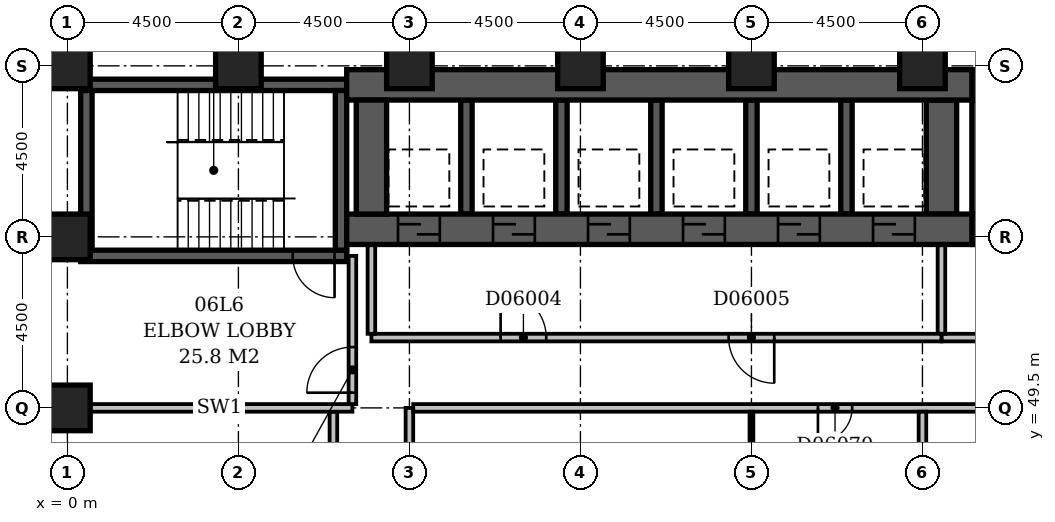
"""IFC4 building model, lengths in metres.
Left out: names, types, materials, properties, quantities, classifications, styles, units other than length and angle.
Written with IfcOpenShell. Run it as: python <this file> out.ifc"""

import sys

from ifc_helpers import new_model, si_unit, direction, frame, frame_2d, origin, origin_2d, place, context, subcontext, project, spatial, rectangle, extrude, element, fill, save


model = new_model("IFC4")
c1 = context("Model", 3, precision=1e-05, world=origin(), true_north=direction((0.0, 1.0)))
c2 = subcontext(c1, "Body", "Model", "MODEL_VIEW")
j1 = project(units=[si_unit("LENGTHUNIT", "METRE"), si_unit("PLANEANGLEUNIT", "RADIAN")], contexts=[c1])
p1 = place(None, origin())
s1 = spatial("IfcSite", under=j1, at=p1, CompositionType="ELEMENT")
p2 = place(p1, origin())
s2 = spatial("IfcBuilding", under=s1, at=p2, CompositionType="ELEMENT")
p3 = place(p2, frame((0.0, 0.0, 32.6)))
s3 = spatial("IfcBuildingStorey", under=s2, at=p3, CompositionType="ELEMENT", Elevation=32.6)
p4 = place(p3, frame((0.35, 53.5, -0.3), z_axis=(0.0, 0.0, 1.0), x_axis=(1.0, 0.0, 0.0)))
e1 = element("IfcWall", 1, at=p4, inside=s3, PredefinedType="SHEAR", context=c2, shape_type="SweptSolid", body=[
    extrude(rectangle(XDim=7.0, YDim=0.3, at=frame_2d((3.5, 0.0))), origin(), (0.0, 0.0, 1.0), 3.6),
])
p5 = place(p4, frame((5.58, 0.0, 0.3)))
e2 = element("IfcOpeningElement", 2, at=p5, cuts=e1, PredefinedType="OPENING", context=c2, shape_type="SweptSolid", body=[
    extrude(rectangle(XDim=1.1, YDim=2.1, at=frame_2d((0.55, 1.05))), frame((0.0, 0.162, 0.0), z_axis=(0.0, -1.0, 0.0), x_axis=(1.0, 0.0, 0.0)), (0.0, 0.0, 1.0), 0.324),
])
p6 = place(p3, frame((0.35, 58.0, -0.3), z_axis=(0.0, 0.0, 1.0), x_axis=(1.0, 0.0, 0.0)))
e3 = element("IfcWall", 3, at=p6, inside=s3, PredefinedType="SHEAR", context=c2, shape_type="SweptSolid", body=[
    extrude(rectangle(XDim=7.0, YDim=0.3, at=frame_2d((3.5, 0.0))), origin(), (0.0, 0.0, 1.0), 3.6),
])
for number, where, z_axis, x_axis in (
    (4, (0.5, 53.65, -0.3), (0.0, 0.0, 1.0), (0.0, 1.0, 0.0)),
    (5, (7.2, 53.65, -0.3), (0.0, 0.0, 1.0), (0.0, 1.0, 0.0)),
):
    element("IfcWall", number, at=place(p3, frame(where, z_axis=z_axis, x_axis=x_axis)), inside=s3, PredefinedType="SHEAR", context=c2, shape_type="SweptSolid", body=[
        extrude(rectangle(XDim=4.2, YDim=0.3, at=frame_2d((2.1, 0.0))), origin(), (0.0, 0.0, 1.0), 3.6),
    ])
p7 = place(p3, frame((7.35, 54.2, -0.3), z_axis=(0.0, 0.0, 1.0), x_axis=(1.0, 0.0, 0.0)))
e6 = element("IfcWall", 6, at=p7, inside=s3, PredefinedType="SHEAR", context=c2, shape_type="SweptSolid", body=[
    extrude(rectangle(XDim=16.45, YDim=0.8, at=frame_2d((8.225, 0.0))), origin(), (0.0, 0.0, 1.0), 3.6),
])
p8 = place(p7, frame((1.35, 0.0, 0.3)))
e7 = element("IfcOpeningElement", 7, at=p8, cuts=e6, PredefinedType="OPENING", context=c2, shape_type="SweptSolid", body=[
    extrude(rectangle(XDim=1.1, YDim=2.1, at=frame_2d((0.55, 1.05))), frame((0.0, 0.412, 0.0), z_axis=(0.0, -1.0, 0.0), x_axis=(1.0, 0.0, 0.0)), (0.0, 0.0, 1.0), 0.824),
])
p9 = place(p7, frame((3.85, 0.0, 0.3)))
e8 = element("IfcOpeningElement", 8, at=p9, cuts=e6, PredefinedType="OPENING", context=c2, shape_type="SweptSolid", body=[
    extrude(rectangle(XDim=1.1, YDim=2.1, at=frame_2d((0.55, 1.05))), frame((0.0, 0.412, 0.0), z_axis=(0.0, -1.0, 0.0), x_axis=(1.0, 0.0, 0.0)), (0.0, 0.0, 1.0), 0.824),
])
p10 = place(p7, frame((6.35, 0.0, 0.3)))
e9 = element("IfcOpeningElement", 9, at=p10, cuts=e6, PredefinedType="OPENING", context=c2, shape_type="SweptSolid", body=[
    extrude(rectangle(XDim=1.1, YDim=2.1, at=frame_2d((0.55, 1.05))), frame((0.0, 0.412, 0.0), z_axis=(0.0, -1.0, 0.0), x_axis=(1.0, 0.0, 0.0)), (0.0, 0.0, 1.0), 0.824),
])
p11 = place(p7, frame((8.85, 0.0, 0.3)))
e10 = element("IfcOpeningElement", 10, at=p11, cuts=e6, PredefinedType="OPENING", context=c2, shape_type="SweptSolid", body=[
    extrude(rectangle(XDim=1.1, YDim=2.1, at=frame_2d((0.55, 1.05))), frame((0.0, 0.412, 0.0), z_axis=(0.0, -1.0, 0.0), x_axis=(1.0, 0.0, 0.0)), (0.0, 0.0, 1.0), 0.824),
])
p12 = place(p7, frame((11.35, 0.0, 0.3)))
e11 = element("IfcOpeningElement", 11, at=p12, cuts=e6, PredefinedType="OPENING", context=c2, shape_type="SweptSolid", body=[
    extrude(rectangle(XDim=1.1, YDim=2.1, at=frame_2d((0.55, 1.05))), frame((0.0, 0.412, 0.0), z_axis=(0.0, -1.0, 0.0), x_axis=(1.0, 0.0, 0.0)), (0.0, 0.0, 1.0), 0.824),
])
p13 = place(p7, frame((13.85, 0.0, 0.3)))
e12 = element("IfcOpeningElement", 12, at=p13, cuts=e6, PredefinedType="OPENING", context=c2, shape_type="SweptSolid", body=[
    extrude(rectangle(XDim=1.1, YDim=2.1, at=frame_2d((0.55, 1.05))), frame((0.0, 0.412, 0.0), z_axis=(0.0, -1.0, 0.0), x_axis=(1.0, 0.0, 0.0)), (0.0, 0.0, 1.0), 0.824),
])
p14 = place(p3, frame((7.35, 58.0, -0.3), z_axis=(0.0, 0.0, 1.0), x_axis=(1.0, 0.0, 0.0)))
e13 = element("IfcWall", 13, at=p14, inside=s3, PredefinedType="SHEAR", context=c2, shape_type="SweptSolid", body=[
    extrude(rectangle(XDim=16.45, YDim=0.8, at=frame_2d((8.225, 0.0))), origin(), (0.0, 0.0, 1.0), 3.6),
])
p15 = place(p3, frame((8.0, 54.6, -0.3), z_axis=(0.0, 0.0, 1.0), x_axis=(0.0, 1.0, 0.0)))
e14 = element("IfcWall", 14, at=p15, inside=s3, PredefinedType="SHEAR", context=c2, shape_type="SweptSolid", body=[
    extrude(rectangle(XDim=3.0, YDim=0.8, at=frame_2d((1.5, 0.0))), origin(), (0.0, 0.0, 1.0), 3.6),
])
for number, where, z_axis, x_axis in (
    (15, (10.5, 54.6, -0.3), (0.0, 0.0, 1.0), (0.0, 1.0, 0.0)),
    (16, (13.0, 54.6, -0.3), (0.0, 0.0, 1.0), (0.0, 1.0, 0.0)),
    (17, (15.5, 54.6, -0.3), (0.0, 0.0, 1.0), (0.0, 1.0, 0.0)),
    (18, (18.0, 54.6, -0.3), (0.0, 0.0, 1.0), (0.0, 1.0, 0.0)),
    (19, (20.5, 54.6, -0.3), (0.0, 0.0, 1.0), (0.0, 1.0, 0.0)),
):
    element("IfcWall", number, at=place(p3, frame(where, z_axis=z_axis, x_axis=x_axis)), inside=s3, PredefinedType="SHEAR", context=c2, shape_type="SweptSolid", body=[
        extrude(rectangle(XDim=3.0, YDim=0.3, at=frame_2d((1.5, 0.0))), origin(), (0.0, 0.0, 1.0), 3.6),
    ])
p16 = place(p3, frame((23.0, 54.6, -0.3), z_axis=(0.0, 0.0, 1.0), x_axis=(0.0, 1.0, 0.0)))
e20 = element("IfcWall", 20, at=p16, inside=s3, PredefinedType="SHEAR", context=c2, shape_type="SweptSolid", body=[
    extrude(rectangle(XDim=3.0, YDim=0.8, at=frame_2d((1.5, 0.0))), origin(), (0.0, 0.0, 1.0), 3.6),
])
p17 = place(p3, frame((23.8, 54.2, -0.3), z_axis=(0.0, 0.0, 1.0), x_axis=(1.0, 0.0, 0.0)))
e21 = element("IfcWall", 21, at=p17, inside=s3, PredefinedType="SHEAR", context=c2, shape_type="SweptSolid", body=[
    extrude(rectangle(XDim=3.3, YDim=0.8, at=frame_2d((1.65, 0.0))), origin(), (0.0, 0.0, 1.0), 3.6),
])
p18 = place(p17, frame((1.1, 0.0, 0.3)))
e22 = element("IfcOpeningElement", 22, at=p18, cuts=e21, PredefinedType="OPENING", context=c2, shape_type="SweptSolid", body=[
    extrude(rectangle(XDim=1.1, YDim=2.1, at=frame_2d((0.55, 1.05))), frame((0.0, 0.412, 0.0), z_axis=(0.0, -1.0, 0.0), x_axis=(1.0, 0.0, 0.0)), (0.0, 0.0, 1.0), 0.824),
])
p19 = place(p3, frame((23.8, 58.0, -0.3), z_axis=(0.0, 0.0, 1.0), x_axis=(1.0, 0.0, 0.0)))
e23 = element("IfcWall", 23, at=p19, inside=s3, PredefinedType="SHEAR", context=c2, shape_type="SweptSolid", body=[
    extrude(rectangle(XDim=3.3, YDim=0.8, at=frame_2d((1.65, 0.0))), origin(), (0.0, 0.0, 1.0), 3.6),
])
p20 = place(p3, frame((24.2, 54.6, -0.3), z_axis=(0.0, 0.0, 1.0), x_axis=(0.0, 1.0, 0.0)))
e24 = element("IfcWall", 24, at=p20, inside=s3, PredefinedType="SHEAR", context=c2, shape_type="SweptSolid", body=[
    extrude(rectangle(XDim=3.0, YDim=0.8, at=frame_2d((1.5, 0.0))), origin(), (0.0, 0.0, 1.0), 3.6),
])
for number, where, z_axis, x_axis in (
    (25, (0.0, 49.5, -0.3), (0.0, 0.0, 1.0), (1.0, 0.0, 0.0)),
    (26, (0.0, 54.0, -0.3), (0.0, 0.0, 1.0), (1.0, 0.0, 0.0)),
    (27, (0.0, 58.5, -0.3), (0.0, 0.0, 1.0), (1.0, 0.0, 0.0)),
    (28, (4.5, 58.5, -0.3), (0.0, 0.0, 1.0), (1.0, 0.0, 0.0)),
    (29, (9.0, 58.5, -0.3), (0.0, 0.0, 1.0), (1.0, 0.0, 0.0)),
    (30, (13.5, 58.5, -0.3), (0.0, 0.0, 1.0), (1.0, 0.0, 0.0)),
    (31, (18.0, 58.5, -0.3), (0.0, 0.0, 1.0), (1.0, 0.0, 0.0)),
    (32, (22.5, 58.5, -0.3), (0.0, 0.0, 1.0), (1.0, 0.0, 0.0)),
):
    element("IfcColumn", number, at=place(p3, frame(where, z_axis=z_axis, x_axis=x_axis)), inside=s3, PredefinedType="COLUMN", context=c2, shape_type="SweptSolid", body=[
        extrude(rectangle(XDim=1.2, YDim=1.2, at=origin_2d()), origin(), (0.0, 0.0, 1.0), 3.6),
    ])
p21 = place(p3, frame((8.0, 51.35, 0.0), z_axis=(0.0, 0.0, 1.0), x_axis=(1.0, 0.0, 0.0)))
e33 = element("IfcWall", 33, at=p21, inside=s3, PredefinedType="PARTITIONING", context=c2, shape_type="SweptSolid", body=[
    extrude(rectangle(XDim=15.0, YDim=0.2, at=frame_2d((7.5, 0.0))), origin(), (0.0, 0.0, 1.0), 3.3),
])
p22 = place(p21, frame((3.4, 0.0, 0.0)))
e34 = element("IfcOpeningElement", 34, at=p22, cuts=e33, PredefinedType="OPENING", context=c2, shape_type="SweptSolid", body=[
    extrude(rectangle(XDim=1.2, YDim=2.1, at=frame_2d((0.6, 1.05))), frame((0.0, 0.112, 0.0), z_axis=(0.0, -1.0, 0.0), x_axis=(1.0, 0.0, 0.0)), (0.0, 0.0, 1.0), 0.224),
])
p23 = place(p21, frame((9.4, 0.0, 0.0)))
e35 = element("IfcOpeningElement", 35, at=p23, cuts=e33, PredefinedType="OPENING", context=c2, shape_type="SweptSolid", body=[
    extrude(rectangle(XDim=1.2, YDim=2.1, at=frame_2d((0.6, 1.05))), frame((0.0, 0.112, 0.0), z_axis=(0.0, -1.0, 0.0), x_axis=(1.0, 0.0, 0.0)), (0.0, 0.0, 1.0), 0.224),
])
for number, where, z_axis, x_axis in (
    (36, (23.0, 51.45, 0.0), (0.0, 0.0, 1.0), (0.0, 1.0, 0.0)),
    (37, (8.0, 51.45, 0.0), (0.0, 0.0, 1.0), (0.0, 1.0, 0.0)),
):
    element("IfcWall", number, at=place(p3, frame(where, z_axis=z_axis, x_axis=x_axis)), inside=s3, PredefinedType="PARTITIONING", context=c2, shape_type="SweptSolid", body=[
        extrude(rectangle(XDim=2.33, YDim=0.2, at=frame_2d((1.165, 0.0))), origin(), (0.0, 0.0, 1.0), 3.3),
    ])
p24 = place(p3, frame((23.0, 51.35, 0.0), z_axis=(0.0, 0.0, 1.0), x_axis=(1.0, 0.0, 0.0)))
e38 = element("IfcWall", 38, at=p24, inside=s3, PredefinedType="PARTITIONING", context=c2, shape_type="SweptSolid", body=[
    extrude(rectangle(XDim=4.8, YDim=0.2, at=frame_2d((2.4, 0.0))), origin(), (0.0, 0.0, 1.0), 3.3),
])
p25 = place(p24, frame((1.65, 0.0, 0.0)))
e39 = element("IfcOpeningElement", 39, at=p25, cuts=e38, PredefinedType="OPENING", context=c2, shape_type="SweptSolid", body=[
    extrude(rectangle(XDim=1.2, YDim=2.1, at=frame_2d((0.6, 1.05))), frame((0.0, 0.112, 0.0), z_axis=(0.0, -1.0, 0.0), x_axis=(1.0, 0.0, 0.0)), (0.0, 0.0, 1.0), 0.224),
])
p26 = place(p3, frame((0.5, 49.5, 0.0), z_axis=(0.0, 0.0, 1.0), x_axis=(1.0, 0.0, 0.0)))
e40 = element("IfcWall", 40, at=p26, inside=s3, PredefinedType="PARTITIONING", context=c2, shape_type="SweptSolid", body=[
    extrude(rectangle(XDim=7.0, YDim=0.2, at=frame_2d((3.5, 0.0))), origin(), (0.0, 0.0, 1.0), 3.3),
])
p27 = place(p3, frame((7.5, 49.6, 0.0), z_axis=(0.0, 0.0, 1.0), x_axis=(0.0, 1.0, 0.0)))
e41 = element("IfcWall", 41, at=p27, inside=s3, PredefinedType="PARTITIONING", context=c2, shape_type="SweptSolid", body=[
    extrude(rectangle(XDim=3.9, YDim=0.2, at=frame_2d((1.95, 0.0))), origin(), (0.0, 0.0, 1.0), 3.3),
])
p28 = place(p27, frame((0.3, 0.0, 0.0)))
e42 = element("IfcOpeningElement", 42, at=p28, cuts=e41, PredefinedType="OPENING", context=c2, shape_type="SweptSolid", body=[
    extrude(rectangle(XDim=1.2, YDim=2.1, at=frame_2d((0.6, 1.05))), frame((0.0, 0.112, 0.0), z_axis=(0.0, -1.0, 0.0), x_axis=(1.0, 0.0, 0.0)), (0.0, 0.0, 1.0), 0.224),
])
p29 = place(p3, frame((9.0, 5.0, 0.0), z_axis=(0.0, 0.0, 1.0), x_axis=(0.0, 1.0, 0.0)))
e43 = element("IfcWall", 43, at=p29, inside=s3, PredefinedType="PARTITIONING", context=c2, shape_type="SweptSolid", body=[
    extrude(rectangle(XDim=44.5, YDim=0.2, at=frame_2d((22.25, 0.0))), origin(), (0.0, 0.0, 1.0), 3.3),
])
p30 = place(p29, frame((24.7, 0.0, 0.0)))
e44 = element("IfcOpeningElement", 44, at=p30, cuts=e43, PredefinedType="OPENING", context=c2, shape_type="SweptSolid", body=[
    extrude(rectangle(XDim=1.0, YDim=2.1, at=frame_2d((0.5, 1.05))), frame((0.0, 0.112, 0.0), z_axis=(0.0, -1.0, 0.0), x_axis=(1.0, 0.0, 0.0)), (0.0, 0.0, 1.0), 0.224),
])
p31 = place(p29, frame((13.3, 0.0, 0.0)))
e45 = element("IfcOpeningElement", 45, at=p31, cuts=e43, PredefinedType="OPENING", context=c2, shape_type="SweptSolid", body=[
    extrude(rectangle(XDim=1.0, YDim=2.1, at=frame_2d((0.5, 1.05))), frame((0.0, 0.112, 0.0), z_axis=(0.0, -1.0, 0.0), x_axis=(1.0, 0.0, 0.0)), (0.0, 0.0, 1.0), 0.224),
])
p32 = place(p29, frame((10.45, 0.0, 0.0)))
e46 = element("IfcOpeningElement", 46, at=p32, cuts=e43, PredefinedType="OPENING", context=c2, shape_type="SweptSolid", body=[
    extrude(rectangle(XDim=1.0, YDim=2.1, at=frame_2d((0.5, 1.05))), frame((0.0, 0.112, 0.0), z_axis=(0.0, -1.0, 0.0), x_axis=(1.0, 0.0, 0.0)), (0.0, 0.0, 1.0), 0.224),
])
p33 = place(p29, frame((5.95, 0.0, 0.0)))
e47 = element("IfcOpeningElement", 47, at=p33, cuts=e43, PredefinedType="OPENING", context=c2, shape_type="SweptSolid", body=[
    extrude(rectangle(XDim=1.0, YDim=2.1, at=frame_2d((0.5, 1.05))), frame((0.0, 0.112, 0.0), z_axis=(0.0, -1.0, 0.0), x_axis=(1.0, 0.0, 0.0)), (0.0, 0.0, 1.0), 0.224),
])
p34 = place(p29, frame((37.25, 0.0, 0.0)))
e48 = element("IfcOpeningElement", 48, at=p34, cuts=e43, PredefinedType="OPENING", context=c2, shape_type="SweptSolid", body=[
    extrude(rectangle(XDim=0.9, YDim=2.1, at=frame_2d((0.45, 1.05))), frame((0.0, 0.112, 0.0), z_axis=(0.0, -1.0, 0.0), x_axis=(1.0, 0.0, 0.0)), (0.0, 0.0, 1.0), 0.224),
])
p35 = place(p29, frame((1.5, 0.0, 0.0)))
e49 = element("IfcOpeningElement", 49, at=p35, cuts=e43, PredefinedType="OPENING", context=c2, shape_type="SweptSolid", body=[
    extrude(rectangle(XDim=0.9, YDim=2.1, at=frame_2d((0.45, 1.05))), frame((0.0, 0.112, 0.0), z_axis=(0.0, -1.0, 0.0), x_axis=(1.0, 0.0, 0.0)), (0.0, 0.0, 1.0), 0.224),
])
p36 = place(p3, frame((7.0, 34.6, 0.0), z_axis=(0.0, 0.0, 1.0), x_axis=(0.0, 1.0, 0.0)))
e50 = element("IfcWall", 50, at=p36, inside=s3, PredefinedType="PARTITIONING", context=c2, shape_type="SweptSolid", body=[
    extrude(rectangle(XDim=14.8, YDim=0.2, at=frame_2d((7.4, 0.0))), origin(), (0.0, 0.0, 1.0), 3.3),
])
p37 = place(p36, frame((6.95, 0.0, 0.0)))
e51 = element("IfcOpeningElement", 51, at=p37, cuts=e50, PredefinedType="OPENING", context=c2, shape_type="SweptSolid", body=[
    extrude(rectangle(XDim=0.9, YDim=2.1, at=frame_2d((0.45, 1.05))), frame((0.0, 0.112, 0.0), z_axis=(0.0, -1.0, 0.0), x_axis=(1.0, 0.0, 0.0)), (0.0, 0.0, 1.0), 0.224),
])
p38 = place(p3, frame((18.0, 36.1, 0.0), z_axis=(0.0, 0.0, 1.0), x_axis=(0.0, 1.0, 0.0)))
e52 = element("IfcWall", 52, at=p38, inside=s3, PredefinedType="PARTITIONING", context=c2, shape_type="SweptSolid", body=[
    extrude(rectangle(XDim=13.3, YDim=0.1, at=frame_2d((6.65, 0.0))), origin(), (0.0, 0.0, 1.0), 3.3),
])
p39 = place(p3, frame((22.5, 36.6, 0.0), z_axis=(0.0, 0.0, 1.0), x_axis=(0.0, 1.0, 0.0)))
e53 = element("IfcWall", 53, at=p39, inside=s3, PredefinedType="PARTITIONING", context=c2, shape_type="SweptSolid", body=[
    extrude(rectangle(XDim=12.8, YDim=0.2, at=frame_2d((6.4, 0.0))), origin(), (0.0, 0.0, 1.0), 3.3),
])
p40 = place(p3, frame((9.1, 49.5, 0.0), z_axis=(0.0, 0.0, 1.0), x_axis=(1.0, 0.0, 0.0)))
e54 = element("IfcWall", 54, at=p40, inside=s3, PredefinedType="PARTITIONING", context=c2, shape_type="SweptSolid", body=[
    extrude(rectangle(XDim=57.8, YDim=0.2, at=frame_2d((28.9, 0.0))), origin(), (0.0, 0.0, 1.0), 3.3),
])
p41 = place(p40, frame((20.6, 0.0, 0.0)))
e55 = element("IfcOpeningElement", 55, at=p41, cuts=e54, PredefinedType="OPENING", context=c2, shape_type="SweptSolid", body=[
    extrude(rectangle(XDim=1.0, YDim=2.1, at=frame_2d((0.5, 1.05))), frame((0.0, 0.112, 0.0), z_axis=(0.0, -1.0, 0.0), x_axis=(1.0, 0.0, 0.0)), (0.0, 0.0, 1.0), 0.224),
])
p42 = place(p40, frame((31.7, 0.0, 0.0)))
e56 = element("IfcOpeningElement", 56, at=p42, cuts=e54, PredefinedType="OPENING", context=c2, shape_type="SweptSolid", body=[
    extrude(rectangle(XDim=1.0, YDim=2.1, at=frame_2d((0.5, 1.05))), frame((0.0, 0.112, 0.0), z_axis=(0.0, -1.0, 0.0), x_axis=(1.0, 0.0, 0.0)), (0.0, 0.0, 1.0), 0.224),
])
p43 = place(p40, frame((47.6, 0.0, 0.0)))
e57 = element("IfcOpeningElement", 57, at=p43, cuts=e54, PredefinedType="OPENING", context=c2, shape_type="SweptSolid", body=[
    extrude(rectangle(XDim=1.0, YDim=2.1, at=frame_2d((0.5, 1.05))), frame((0.0, 0.112, 0.0), z_axis=(0.0, -1.0, 0.0), x_axis=(1.0, 0.0, 0.0)), (0.0, 0.0, 1.0), 0.224),
])
p44 = place(p40, frame((54.15, 0.0, 0.0)))
e58 = element("IfcOpeningElement", 58, at=p44, cuts=e54, PredefinedType="OPENING", context=c2, shape_type="SweptSolid", body=[
    extrude(rectangle(XDim=1.0, YDim=2.1, at=frame_2d((0.5, 1.05))), frame((0.0, 0.112, 0.0), z_axis=(0.0, -1.0, 0.0), x_axis=(1.0, 0.0, 0.0)), (0.0, 0.0, 1.0), 0.224),
])
p45 = place(p40, frame((10.65, 0.0, 0.0)))
e59 = element("IfcOpeningElement", 59, at=p45, cuts=e54, PredefinedType="OPENING", context=c2, shape_type="SweptSolid", body=[
    extrude(rectangle(XDim=0.9, YDim=2.1, at=frame_2d((0.45, 1.05))), frame((0.0, 0.112, 0.0), z_axis=(0.0, -1.0, 0.0), x_axis=(1.0, 0.0, 0.0)), (0.0, 0.0, 1.0), 0.224),
])
p46 = place(p28, origin())
e60 = element("IfcDoor", 60, at=p46, inside=s3, OperationType="SINGLE_SWING_LEFT", PredefinedType="DOOR", context=c2, shape_type="SweptSolid", body=[
    extrude(rectangle(XDim=1.2, YDim=2.1, at=frame_2d((0.6, 1.05))), frame((0.0, 0.025, 0.0), z_axis=(0.0, -1.0, 0.0), x_axis=(1.0, 0.0, 0.0)), (0.0, 0.0, 1.0), 0.05),
])
fill(e42, e60)
p47 = place(p8, origin())
e61 = element("IfcDoor", 61, at=p47, inside=s3, OperationType="SLIDING_TO_LEFT", PredefinedType="DOOR", context=c2, shape_type="SweptSolid", body=[
    extrude(rectangle(XDim=1.1, YDim=2.1, at=frame_2d((0.55, 1.05))), frame((0.0, 0.025, 0.0), z_axis=(0.0, -1.0, 0.0), x_axis=(1.0, 0.0, 0.0)), (0.0, 0.0, 1.0), 0.05),
])
fill(e7, e61)
p48 = place(p9, origin())
e62 = element("IfcDoor", 62, at=p48, inside=s3, OperationType="SLIDING_TO_LEFT", PredefinedType="DOOR", context=c2, shape_type="SweptSolid", body=[
    extrude(rectangle(XDim=1.1, YDim=2.1, at=frame_2d((0.55, 1.05))), frame((0.0, 0.025, 0.0), z_axis=(0.0, -1.0, 0.0), x_axis=(1.0, 0.0, 0.0)), (0.0, 0.0, 1.0), 0.05),
])
fill(e8, e62)
p49 = place(p10, origin())
e63 = element("IfcDoor", 63, at=p49, inside=s3, OperationType="SLIDING_TO_LEFT", PredefinedType="DOOR", context=c2, shape_type="SweptSolid", body=[
    extrude(rectangle(XDim=1.1, YDim=2.1, at=frame_2d((0.55, 1.05))), frame((0.0, 0.025, 0.0), z_axis=(0.0, -1.0, 0.0), x_axis=(1.0, 0.0, 0.0)), (0.0, 0.0, 1.0), 0.05),
])
fill(e9, e63)
p50 = place(p11, origin())
e64 = element("IfcDoor", 64, at=p50, inside=s3, OperationType="SLIDING_TO_LEFT", PredefinedType="DOOR", context=c2, shape_type="SweptSolid", body=[
    extrude(rectangle(XDim=1.1, YDim=2.1, at=frame_2d((0.55, 1.05))), frame((0.0, 0.025, 0.0), z_axis=(0.0, -1.0, 0.0), x_axis=(1.0, 0.0, 0.0)), (0.0, 0.0, 1.0), 0.05),
])
fill(e10, e64)
p51 = place(p12, origin())
e65 = element("IfcDoor", 65, at=p51, inside=s3, OperationType="SLIDING_TO_LEFT", PredefinedType="DOOR", context=c2, shape_type="SweptSolid", body=[
    extrude(rectangle(XDim=1.1, YDim=2.1, at=frame_2d((0.55, 1.05))), frame((0.0, 0.025, 0.0), z_axis=(0.0, -1.0, 0.0), x_axis=(1.0, 0.0, 0.0)), (0.0, 0.0, 1.0), 0.05),
])
fill(e11, e65)
p52 = place(p13, origin())
e66 = element("IfcDoor", 66, at=p52, inside=s3, OperationType="SLIDING_TO_LEFT", PredefinedType="DOOR", context=c2, shape_type="SweptSolid", body=[
    extrude(rectangle(XDim=1.1, YDim=2.1, at=frame_2d((0.55, 1.05))), frame((0.0, 0.025, 0.0), z_axis=(0.0, -1.0, 0.0), x_axis=(1.0, 0.0, 0.0)), (0.0, 0.0, 1.0), 0.05),
])
fill(e12, e66)
p53 = place(p22, origin())
e67 = element("IfcDoor", 67, at=p53, inside=s3, OperationType="SINGLE_SWING_LEFT", PredefinedType="DOOR", context=c2, shape_type="SweptSolid", body=[
    extrude(rectangle(XDim=1.2, YDim=2.1, at=frame_2d((0.6, 1.05))), frame((0.0, 0.025, 0.0), z_axis=(0.0, -1.0, 0.0), x_axis=(1.0, 0.0, 0.0)), (0.0, 0.0, 1.0), 0.05),
])
fill(e34, e67)
p54 = place(p23, origin())
e68 = element("IfcDoor", 68, at=p54, inside=s3, OperationType="SINGLE_SWING_RIGHT", PredefinedType="DOOR", context=c2, shape_type="SweptSolid", body=[
    extrude(rectangle(XDim=1.2, YDim=2.1, at=frame_2d((0.6, 1.05))), frame((0.0, 0.025, 0.0), z_axis=(0.0, -1.0, 0.0), x_axis=(1.0, 0.0, 0.0)), (0.0, 0.0, 1.0), 0.05),
])
fill(e35, e68)
p55 = place(p5, origin())
e69 = element("IfcDoor", 69, at=p55, inside=s3, OperationType="SINGLE_SWING_RIGHT", PredefinedType="DOOR", context=c2, shape_type="SweptSolid", body=[
    extrude(rectangle(XDim=1.1, YDim=2.1, at=frame_2d((0.55, 1.05))), frame((0.0, 0.025, 0.0), z_axis=(0.0, -1.0, 0.0), x_axis=(1.0, 0.0, 0.0)), (0.0, 0.0, 1.0), 0.05),
])
fill(e2, e69)
p56 = place(p45, frame((0.9, 0.0, 0.0), z_axis=(0.0, 0.0, 1.0), x_axis=(-1.0, 0.0, 0.0)))
e70 = element("IfcDoor", 70, at=p56, inside=s3, OperationType="SINGLE_SWING_RIGHT", PredefinedType="DOOR", context=c2, shape_type="SweptSolid", body=[
    extrude(rectangle(XDim=0.9, YDim=2.1, at=frame_2d((0.45, 1.05))), frame((0.0, 0.025, 0.0), z_axis=(0.0, -1.0, 0.0), x_axis=(1.0, 0.0, 0.0)), (0.0, 0.0, 1.0), 0.05),
])
fill(e59, e70)
save(model, sys.argv[1])
